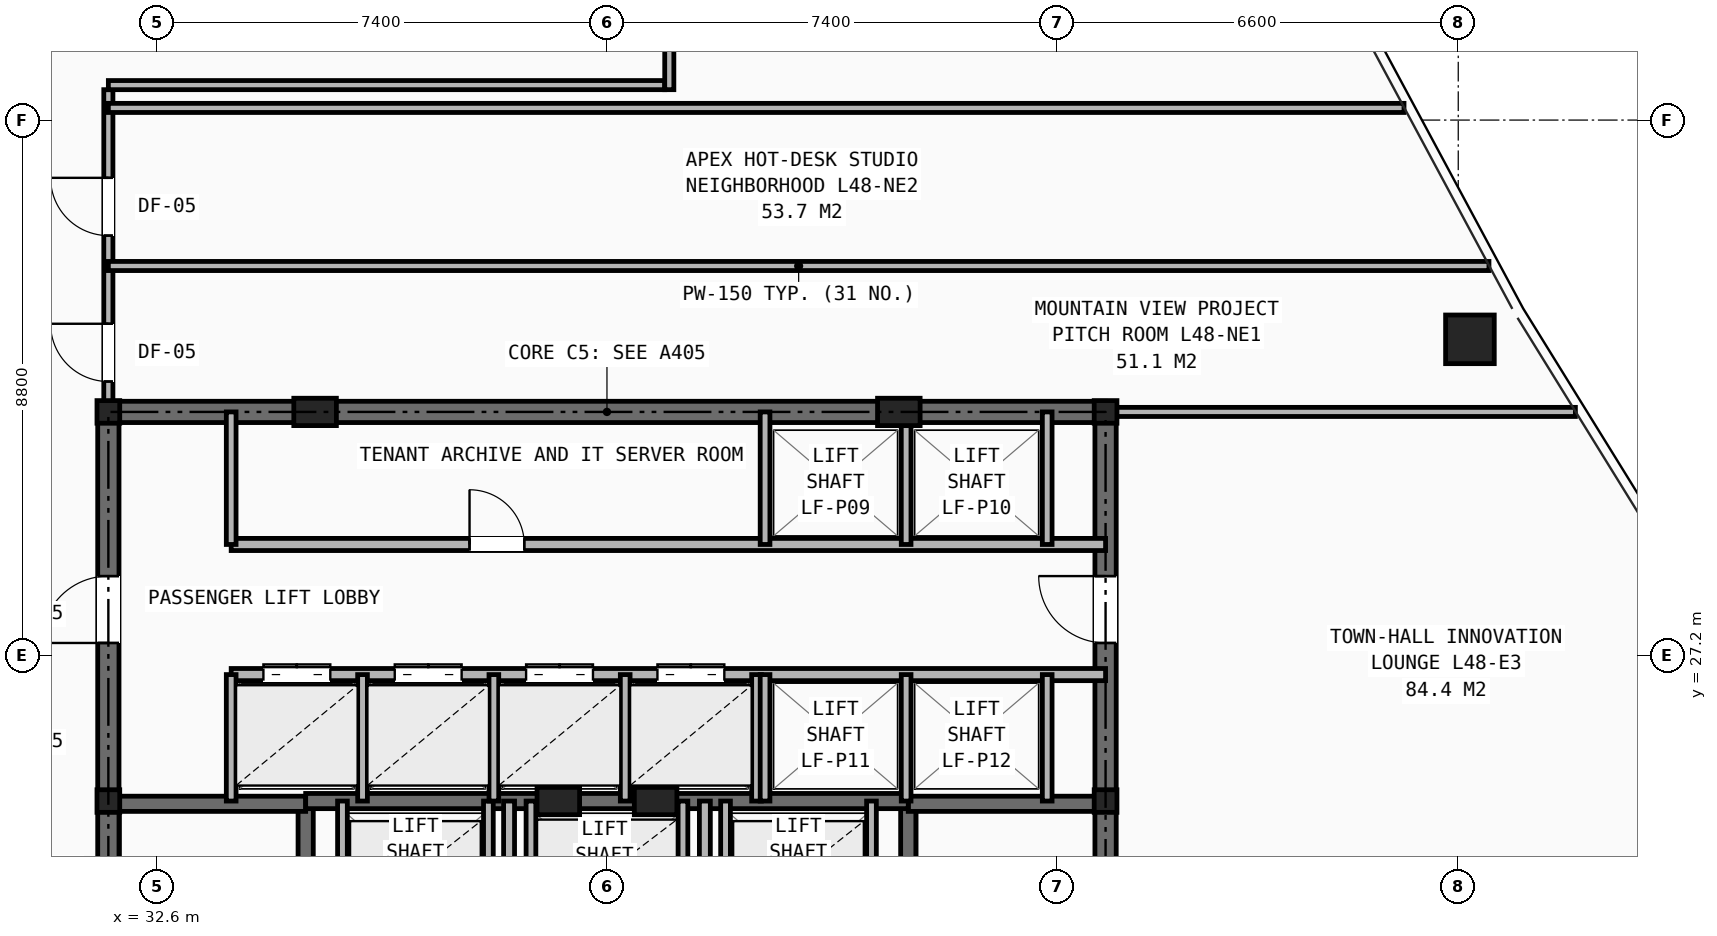
"""IFC4 building model, lengths in metres.
Left out: names, types, materials, properties, quantities, classifications, styles, units other than length and angle.
Written with IfcOpenShell. Run it as: python <this file> out.ifc"""

import sys

from ifc_helpers import new_model, si_unit, direction, frame, frame_2d, origin, origin_2d, place, context, subcontext, project, spatial, rectangle, hollow_rectangle, i_section, extrude, element, fill, save


model = new_model("IFC4")
c1 = context("Model", 3, precision=1e-05, world=origin(), true_north=direction((0.0, 1.0)))
c2 = subcontext(c1, "Body", "Model", "MODEL_VIEW")
j1 = project(units=[si_unit("LENGTHUNIT", "METRE"), si_unit("PLANEANGLEUNIT", "RADIAN")], contexts=[c1])
p1 = place(None, origin())
s1 = spatial("IfcSite", under=j1, at=p1, CompositionType="ELEMENT")
p2 = place(p1, origin())
s2 = spatial("IfcBuilding", under=s1, at=p2, CompositionType="ELEMENT")
p3 = place(p2, frame((0.0, 0.0, 168.9)))
s3 = spatial("IfcBuildingStorey", under=s2, at=p3, CompositionType="ELEMENT", Elevation=168.9)
for number, where, z_axis, x_axis in (
    (1, (31.8, 24.8, 0.0), (0.0, 0.0, 1.0), (1.0, 0.0, 0.0)),
    (2, (48.2, 24.8, 0.0), (0.0, 0.0, 1.0), (1.0, 0.0, 0.0)),
    (3, (31.8, 31.2, 0.0), (0.0, 0.0, 1.0), (1.0, 0.0, 0.0)),
    (4, (48.2, 31.2, 0.0), (0.0, 0.0, 1.0), (1.0, 0.0, 0.0)),
):
    element("IfcColumn", number, at=place(p3, frame(where, z_axis=z_axis, x_axis=x_axis)), inside=s3, PredefinedType="COLUMN", context=c2, shape_type="SweptSolid", body=[
        extrude(i_section(OverallWidth=0.374, OverallDepth=0.372, WebThickness=0.016, FlangeThickness=0.026, at=origin_2d()), origin(), (0.0, 0.0, 1.0), 3.45),
    ])
for number, where, z_axis, x_axis in (
    (5, (35.2, 31.2, 0.0), (0.0, 0.0, 1.0), (1.0, 0.0, 0.0)),
    (6, (44.8, 31.2, 0.0), (0.0, 0.0, 1.0), (1.0, 0.0, 0.0)),
    (7, (39.2, 24.8, 0.0), (0.0, 0.0, 1.0), (1.0, 0.0, 0.0)),
    (8, (40.8, 24.8, 0.0), (0.0, 0.0, 1.0), (1.0, 0.0, 0.0)),
):
    element("IfcColumn", number, at=place(p3, frame(where, z_axis=z_axis, x_axis=x_axis)), inside=s3, PredefinedType="PILASTER", context=c2, shape_type="SweptSolid", body=[
        extrude(rectangle(XDim=0.7, YDim=0.45, at=origin_2d()), origin(), (0.0, 0.0, 1.0), 3.45),
    ])
p4 = place(p3, frame((54.192, 32.394, 0.0), z_axis=(0.0, 0.0, 1.0), x_axis=(1.0, 0.0, 0.0)))
e9 = element("IfcColumn", 9, at=p4, inside=s3, PredefinedType="COLUMN", context=c2, shape_type="SweptSolid", body=[
    extrude(hollow_rectangle(XDim=0.8, YDim=0.8, WallThickness=0.055, at=origin_2d()), origin(), (0.0, 0.0, 1.0), 3.45),
])
p5 = place(p3, frame((31.8, 31.2, 0.0), z_axis=(0.0, 0.0, 1.0), x_axis=(1.0, 0.0, 0.0)))
e10 = element("IfcWall", 10, at=p5, inside=s3, PredefinedType="SHEAR", context=c2, shape_type="SweptSolid", body=[
    extrude(rectangle(XDim=16.4, YDim=0.35, at=frame_2d((8.2, 0.0))), origin(), (0.0, 0.0, 1.0), 3.21),
])
p6 = place(p3, frame((31.8, 16.4, 0.0), z_axis=(0.0, 0.0, 1.0), x_axis=(0.0, 1.0, 0.0)))
e11 = element("IfcWall", 11, at=p6, inside=s3, PredefinedType="SHEAR", context=c2, shape_type="SweptSolid", body=[
    extrude(rectangle(XDim=14.8, YDim=0.35, at=frame_2d((7.4, 0.0))), origin(), (0.0, 0.0, 1.0), 3.21),
])
p7 = place(p6, frame((11.0, 0.0, 0.0)))
e12 = element("IfcOpeningElement", 12, at=p7, cuts=e11, PredefinedType="OPENING", context=c2, shape_type="SweptSolid", body=[
    extrude(rectangle(XDim=1.1, YDim=2.15, at=frame_2d((0.55, 1.075))), frame((0.0, 0.185, 0.0), z_axis=(0.0, -1.0, 0.0), x_axis=(1.0, 0.0, 0.0)), (0.0, 0.0, 1.0), 0.37),
])
p8 = place(p3, frame((48.2, 16.4, 0.0), z_axis=(0.0, 0.0, 1.0), x_axis=(0.0, 1.0, 0.0)))
e13 = element("IfcWall", 13, at=p8, inside=s3, PredefinedType="SHEAR", context=c2, shape_type="SweptSolid", body=[
    extrude(rectangle(XDim=14.8, YDim=0.35, at=frame_2d((7.4, 0.0))), origin(), (0.0, 0.0, 1.0), 3.21),
])
p9 = place(p8, frame((11.0, 0.0, 0.0)))
e14 = element("IfcOpeningElement", 14, at=p9, cuts=e13, PredefinedType="OPENING", context=c2, shape_type="SweptSolid", body=[
    extrude(rectangle(XDim=1.1, YDim=2.15, at=frame_2d((0.55, 1.075))), frame((0.0, 0.185, 0.0), z_axis=(0.0, -1.0, 0.0), x_axis=(1.0, 0.0, 0.0)), (0.0, 0.0, 1.0), 0.37),
])
p10 = place(p3, frame((35.045, 16.4, 0.0), z_axis=(0.0, 0.0, 1.0), x_axis=(0.0, 1.0, 0.0)))
e15 = element("IfcWall", 15, at=p10, inside=s3, PredefinedType="SHEAR", context=c2, shape_type="SweptSolid", body=[
    extrude(rectangle(XDim=8.4, YDim=0.25, at=frame_2d((4.2, 0.0))), origin(), (0.0, 0.0, 1.0), 3.21),
])
p11 = place(p10, frame((0.45, 0.0, 0.0)))
e16 = element("IfcOpeningElement", 16, at=p11, cuts=e15, PredefinedType="OPENING", context=c2, shape_type="SweptSolid", body=[
    extrude(rectangle(XDim=0.95, YDim=2.1, at=frame_2d((0.475, 1.05))), frame((0.0, 0.135, 0.0), z_axis=(0.0, -1.0, 0.0), x_axis=(1.0, 0.0, 0.0)), (0.0, 0.0, 1.0), 0.27),
])
p12 = place(p3, frame((31.8, 24.755, 0.0), z_axis=(0.0, 0.0, 1.0), x_axis=(1.0, 0.0, 0.0)))
e17 = element("IfcWall", 17, at=p12, inside=s3, PredefinedType="SHEAR", context=c2, shape_type="SweptSolid", body=[
    extrude(rectangle(XDim=3.245, YDim=0.25, at=frame_2d((1.623, 0.0))), origin(), (0.0, 0.0, 1.0), 3.21),
])
p13 = place(p3, frame((44.955, 16.4, 0.0), z_axis=(0.0, 0.0, 1.0), x_axis=(0.0, 1.0, 0.0)))
e18 = element("IfcWall", 18, at=p13, inside=s3, PredefinedType="SHEAR", context=c2, shape_type="SweptSolid", body=[
    extrude(rectangle(XDim=8.4, YDim=0.25, at=frame_2d((4.2, 0.0))), origin(), (0.0, 0.0, 1.0), 3.21),
])
p14 = place(p13, frame((0.45, 0.0, 0.0)))
e19 = element("IfcOpeningElement", 19, at=p14, cuts=e18, PredefinedType="OPENING", context=c2, shape_type="SweptSolid", body=[
    extrude(rectangle(XDim=0.95, YDim=2.1, at=frame_2d((0.475, 1.05))), frame((0.0, 0.135, 0.0), z_axis=(0.0, -1.0, 0.0), x_axis=(1.0, 0.0, 0.0)), (0.0, 0.0, 1.0), 0.27),
])
p15 = place(p3, frame((44.955, 24.755, 0.0), z_axis=(0.0, 0.0, 1.0), x_axis=(1.0, 0.0, 0.0)))
e20 = element("IfcWall", 20, at=p15, inside=s3, PredefinedType="SHEAR", context=c2, shape_type="SweptSolid", body=[
    extrude(rectangle(XDim=3.245, YDim=0.25, at=frame_2d((1.623, 0.0))), origin(), (0.0, 0.0, 1.0), 3.21),
])
p16 = place(p3, frame((35.045, 24.8, 0.0), z_axis=(0.0, 0.0, 1.0), x_axis=(1.0, 0.0, 0.0)))
e21 = element("IfcWall", 21, at=p16, inside=s3, PredefinedType="SHEAR", context=c2, shape_type="SweptSolid", body=[
    extrude(rectangle(XDim=9.91, YDim=0.25, at=frame_2d((4.955, 0.0))), origin(), (0.0, 0.0, 1.0), 3.21),
])
p17 = place(p3, frame((38.39, 16.4, 0.0), z_axis=(0.0, 0.0, 1.0), x_axis=(0.0, 1.0, 0.0)))
e22 = element("IfcWall", 22, at=p17, inside=s3, PredefinedType="PARTITIONING", context=c2, shape_type="SweptSolid", body=[
    extrude(rectangle(XDim=8.4, YDim=0.18, at=frame_2d((4.2, 0.0))), origin(), (0.0, 0.0, 1.0), 2.665),
])
p18 = place(p17, frame((1.8, 0.0, 0.0)))
e23 = element("IfcOpeningElement", 23, at=p18, cuts=e22, PredefinedType="OPENING", context=c2, shape_type="SweptSolid", body=[
    extrude(rectangle(XDim=0.85, YDim=2.05, at=frame_2d((0.425, 1.025))), frame((0.0, 0.1, 0.0), z_axis=(0.0, -1.0, 0.0), x_axis=(1.0, 0.0, 0.0)), (0.0, 0.0, 1.0), 0.2),
])
p19 = place(p17, frame((4.35, 0.0, 0.0)))
e24 = element("IfcOpeningElement", 24, at=p19, cuts=e22, PredefinedType="OPENING", context=c2, shape_type="SweptSolid", body=[
    extrude(rectangle(XDim=0.95, YDim=2.1, at=frame_2d((0.475, 1.05))), frame((0.0, 0.1, 0.0), z_axis=(0.0, -1.0, 0.0), x_axis=(1.0, 0.0, 0.0)), (0.0, 0.0, 1.0), 0.2),
])
p20 = place(p3, frame((41.61, 16.4, 0.0), z_axis=(0.0, 0.0, 1.0), x_axis=(0.0, 1.0, 0.0)))
e25 = element("IfcWall", 25, at=p20, inside=s3, PredefinedType="PARTITIONING", context=c2, shape_type="SweptSolid", body=[
    extrude(rectangle(XDim=8.4, YDim=0.18, at=frame_2d((4.2, 0.0))), origin(), (0.0, 0.0, 1.0), 2.665),
])
p21 = place(p20, frame((1.8, 0.0, 0.0)))
e26 = element("IfcOpeningElement", 26, at=p21, cuts=e25, PredefinedType="OPENING", context=c2, shape_type="SweptSolid", body=[
    extrude(rectangle(XDim=0.85, YDim=2.05, at=frame_2d((0.425, 1.025))), frame((0.0, 0.1, 0.0), z_axis=(0.0, -1.0, 0.0), x_axis=(1.0, 0.0, 0.0)), (0.0, 0.0, 1.0), 0.2),
])
for number, where, z_axis, x_axis in (
    (27, (35.65, 22.48, 0.0), (0.0, 0.0, 1.0), (0.0, 1.0, 0.0)),
    (28, (38.05, 22.48, 0.0), (0.0, 0.0, 1.0), (0.0, 1.0, 0.0)),
    (29, (41.95, 22.48, 0.0), (0.0, 0.0, 1.0), (0.0, 1.0, 0.0)),
    (30, (44.35, 22.48, 0.0), (0.0, 0.0, 1.0), (0.0, 1.0, 0.0)),
    (31, (38.75, 22.48, 0.0), (0.0, 0.0, 1.0), (0.0, 1.0, 0.0)),
    (32, (41.25, 22.48, 0.0), (0.0, 0.0, 1.0), (0.0, 1.0, 0.0)),
):
    element("IfcWall", number, at=place(p3, frame(where, z_axis=z_axis, x_axis=x_axis)), inside=s3, PredefinedType="SOLIDWALL", context=c2, shape_type="SweptSolid", body=[
        extrude(rectangle(XDim=2.32, YDim=0.16, at=frame_2d((1.16, 0.0))), origin(), (0.0, 0.0, 1.0), 3.21),
    ])
p22 = place(p3, frame((33.82, 29.02, 0.0), z_axis=(0.0, 0.0, 1.0), x_axis=(1.0, 0.0, 0.0)))
e33 = element("IfcWall", 33, at=p22, inside=s3, PredefinedType="SOLIDWALL", context=c2, shape_type="SweptSolid", body=[
    extrude(rectangle(XDim=14.38, YDim=0.2, at=frame_2d((7.19, 0.0))), origin(), (0.0, 0.0, 1.0), 2.665),
])
p23 = place(p22, frame((3.92, 0.0, 0.0)))
e34 = element("IfcOpeningElement", 34, at=p23, cuts=e33, PredefinedType="OPENING", context=c2, shape_type="SweptSolid", body=[
    extrude(rectangle(XDim=0.9, YDim=2.1, at=frame_2d((0.45, 1.05))), frame((0.0, 0.11, 0.0), z_axis=(0.0, -1.0, 0.0), x_axis=(1.0, 0.0, 0.0)), (0.0, 0.0, 1.0), 0.22),
])
p24 = place(p3, frame((33.82, 26.88, 0.0), z_axis=(0.0, 0.0, 1.0), x_axis=(1.0, 0.0, 0.0)))
e35 = element("IfcWall", 35, at=p24, inside=s3, PredefinedType="SOLIDWALL", context=c2, shape_type="SweptSolid", body=[
    extrude(rectangle(XDim=14.38, YDim=0.2, at=frame_2d((7.19, 0.0))), origin(), (0.0, 0.0, 1.0), 2.665),
])
p25 = place(p24, frame((0.53, 0.0, 0.0)))
e36 = element("IfcOpeningElement", 36, at=p25, cuts=e35, PredefinedType="OPENING", context=c2, shape_type="SweptSolid", body=[
    extrude(rectangle(XDim=1.1, YDim=2.15, at=frame_2d((0.55, 1.075))), frame((0.0, 0.11, 0.0), z_axis=(0.0, -1.0, 0.0), x_axis=(1.0, 0.0, 0.0)), (0.0, 0.0, 1.0), 0.22),
])
p26 = place(p24, frame((2.69, 0.0, 0.0)))
e37 = element("IfcOpeningElement", 37, at=p26, cuts=e35, PredefinedType="OPENING", context=c2, shape_type="SweptSolid", body=[
    extrude(rectangle(XDim=1.1, YDim=2.15, at=frame_2d((0.55, 1.075))), frame((0.0, 0.11, 0.0), z_axis=(0.0, -1.0, 0.0), x_axis=(1.0, 0.0, 0.0)), (0.0, 0.0, 1.0), 0.22),
])
p27 = place(p24, frame((4.85, 0.0, 0.0)))
e38 = element("IfcOpeningElement", 38, at=p27, cuts=e35, PredefinedType="OPENING", context=c2, shape_type="SweptSolid", body=[
    extrude(rectangle(XDim=1.1, YDim=2.15, at=frame_2d((0.55, 1.075))), frame((0.0, 0.11, 0.0), z_axis=(0.0, -1.0, 0.0), x_axis=(1.0, 0.0, 0.0)), (0.0, 0.0, 1.0), 0.22),
])
p28 = place(p24, frame((7.01, 0.0, 0.0)))
e39 = element("IfcOpeningElement", 39, at=p28, cuts=e35, PredefinedType="OPENING", context=c2, shape_type="SweptSolid", body=[
    extrude(rectangle(XDim=1.1, YDim=2.15, at=frame_2d((0.55, 1.075))), frame((0.0, 0.11, 0.0), z_axis=(0.0, -1.0, 0.0), x_axis=(1.0, 0.0, 0.0)), (0.0, 0.0, 1.0), 0.22),
])
p29 = place(p3, frame((33.82, 29.02, 0.0), z_axis=(0.0, 0.0, 1.0), x_axis=(0.0, 1.0, 0.0)))
e40 = element("IfcWall", 40, at=p29, inside=s3, PredefinedType="SOLIDWALL", context=c2, shape_type="SweptSolid", body=[
    extrude(rectangle(XDim=2.18, YDim=0.16, at=frame_2d((1.09, 0.0))), origin(), (0.0, 0.0, 1.0), 2.665),
])
for number, where, z_axis, x_axis in (
    (41, (33.82, 24.8, 0.0), (0.0, 0.0, 1.0), (0.0, 1.0, 0.0)),
    (42, (35.98, 24.8, 0.0), (0.0, 0.0, 1.0), (0.0, 1.0, 0.0)),
    (43, (38.14, 24.8, 0.0), (0.0, 0.0, 1.0), (0.0, 1.0, 0.0)),
    (44, (40.3, 24.8, 0.0), (0.0, 0.0, 1.0), (0.0, 1.0, 0.0)),
    (45, (42.46, 24.8, 0.0), (0.0, 0.0, 1.0), (0.0, 1.0, 0.0)),
):
    element("IfcWall", number, at=place(p3, frame(where, z_axis=z_axis, x_axis=x_axis)), inside=s3, PredefinedType="SOLIDWALL", context=c2, shape_type="SweptSolid", body=[
        extrude(rectangle(XDim=2.08, YDim=0.16, at=frame_2d((1.04, 0.0))), origin(), (0.0, 0.0, 1.0), 3.21),
    ])
for number, where, z_axis, x_axis in (
    (46, (42.6, 29.02, 0.0), (0.0, 0.0, 1.0), (0.0, 1.0, 0.0)),
    (47, (44.92, 29.02, 0.0), (0.0, 0.0, 1.0), (0.0, 1.0, 0.0)),
    (48, (47.24, 29.02, 0.0), (0.0, 0.0, 1.0), (0.0, 1.0, 0.0)),
):
    element("IfcWall", number, at=place(p3, frame(where, z_axis=z_axis, x_axis=x_axis)), inside=s3, PredefinedType="SOLIDWALL", context=c2, shape_type="SweptSolid", body=[
        extrude(rectangle(XDim=2.18, YDim=0.16, at=frame_2d((1.09, 0.0))), origin(), (0.0, 0.0, 1.0), 2.665),
    ])
for number, where, z_axis, x_axis in (
    (49, (42.6, 24.8, 0.0), (0.0, 0.0, 1.0), (0.0, 1.0, 0.0)),
    (50, (44.92, 24.8, 0.0), (0.0, 0.0, 1.0), (0.0, 1.0, 0.0)),
    (51, (47.24, 24.8, 0.0), (0.0, 0.0, 1.0), (0.0, 1.0, 0.0)),
):
    element("IfcWall", number, at=place(p3, frame(where, z_axis=z_axis, x_axis=x_axis)), inside=s3, PredefinedType="SOLIDWALL", context=c2, shape_type="SweptSolid", body=[
        extrude(rectangle(XDim=2.08, YDim=0.16, at=frame_2d((1.04, 0.0))), origin(), (0.0, 0.0, 1.0), 3.21),
    ])
p30 = place(p3, frame((31.8, 31.2, 0.0), z_axis=(0.0, 0.0, 1.0), x_axis=(0.0, 1.0, 0.0)))
e52 = element("IfcWall", 52, at=p30, inside=s3, PredefinedType="PARTITIONING", context=c2, shape_type="SweptSolid", body=[
    extrude(rectangle(XDim=5.3, YDim=0.15, at=frame_2d((2.65, 0.0))), origin(), (0.0, 0.0, 1.0), 2.225),
])
p31 = place(p30, frame((0.5, 0.0, 0.0)))
e53 = element("IfcOpeningElement", 53, at=p31, cuts=e52, PredefinedType="OPENING", context=c2, shape_type="SweptSolid", body=[
    extrude(rectangle(XDim=0.95, YDim=2.1, at=frame_2d((0.475, 1.05))), frame((0.0, 0.085, 0.0), z_axis=(0.0, -1.0, 0.0), x_axis=(1.0, 0.0, 0.0)), (0.0, 0.0, 1.0), 0.17),
])
p32 = place(p30, frame((2.9, 0.0, 0.0)))
e54 = element("IfcOpeningElement", 54, at=p32, cuts=e52, PredefinedType="OPENING", context=c2, shape_type="SweptSolid", body=[
    extrude(rectangle(XDim=0.95, YDim=2.1, at=frame_2d((0.475, 1.05))), frame((0.0, 0.085, 0.0), z_axis=(0.0, -1.0, 0.0), x_axis=(1.0, 0.0, 0.0)), (0.0, 0.0, 1.0), 0.17),
])
p33 = place(p3, frame((48.2, 31.2, 0.0), z_axis=(0.0, 0.0, 1.0), x_axis=(1.0, 0.0, 0.0)))
e55 = element("IfcWall", 55, at=p33, inside=s3, PredefinedType="PARTITIONING", context=c2, shape_type="SweptSolid", body=[
    extrude(rectangle(XDim=7.727, YDim=0.15, at=frame_2d((3.863, 0.0))), origin(), (0.0, 0.0, 1.0), 2.225),
])
p34 = place(p3, frame((31.8, 33.6, 0.0), z_axis=(0.0, 0.0, 1.0), x_axis=(1.0, 0.0, 0.0)))
e56 = element("IfcWall", 56, at=p34, inside=s3, PredefinedType="PARTITIONING", context=c2, shape_type="SweptSolid", body=[
    extrude(rectangle(XDim=22.705, YDim=0.15, at=frame_2d((11.353, 0.0))), origin(), (0.0, 0.0, 1.0), 2.589),
])
p35 = place(p3, frame((31.8, 36.2, 0.0), z_axis=(0.0, 0.0, 1.0), x_axis=(1.0, 0.0, 0.0)))
e57 = element("IfcWall", 57, at=p35, inside=s3, PredefinedType="PARTITIONING", context=c2, shape_type="SweptSolid", body=[
    extrude(rectangle(XDim=21.308, YDim=0.15, at=frame_2d((10.654, 0.0))), origin(), (0.0, 0.0, 1.0), 2.589),
])
p36 = place(p3, frame((31.8, 36.575, 0.0), z_axis=(0.0, 0.0, 1.0), x_axis=(1.0, 0.0, 0.0)))
e58 = element("IfcWall", 58, at=p36, inside=s3, PredefinedType="PARTITIONING", context=c2, shape_type="SweptSolid", body=[
    extrude(rectangle(XDim=9.15, YDim=0.15, at=frame_2d((4.575, 0.0))), origin(), (0.0, 0.0, 1.0), 3.21),
])
p37 = place(p3, frame((41.025, 36.5, 0.0), z_axis=(0.0, 0.0, 1.0), x_axis=(0.0, 1.0, 0.0)))
e59 = element("IfcWall", 59, at=p37, inside=s3, PredefinedType="PARTITIONING", context=c2, shape_type="SweptSolid", body=[
    extrude(rectangle(XDim=1.95, YDim=0.15, at=frame_2d((0.975, 0.0))), origin(), (0.0, 0.0, 1.0), 3.21),
])
p38 = place(p7, origin())
e60 = element("IfcDoor", 60, at=p38, inside=s3, OperationType="SINGLE_SWING_LEFT", PredefinedType="DOOR", context=c2, shape_type="SweptSolid", body=[
    extrude(rectangle(XDim=1.1, YDim=2.15, at=frame_2d((0.55, 1.075))), frame((0.0, 0.025, 0.0), z_axis=(0.0, -1.0, 0.0), x_axis=(1.0, 0.0, 0.0)), (0.0, 0.0, 1.0), 0.05),
])
fill(e12, e60)
p39 = place(p9, origin())
e61 = element("IfcDoor", 61, at=p39, inside=s3, OperationType="SINGLE_SWING_RIGHT", PredefinedType="DOOR", context=c2, shape_type="SweptSolid", body=[
    extrude(rectangle(XDim=1.1, YDim=2.15, at=frame_2d((0.55, 1.075))), frame((0.0, 0.025, 0.0), z_axis=(0.0, -1.0, 0.0), x_axis=(1.0, 0.0, 0.0)), (0.0, 0.0, 1.0), 0.05),
])
fill(e14, e61)
p40 = place(p23, origin())
e62 = element("IfcDoor", 62, at=p40, inside=s3, OperationType="SINGLE_SWING_LEFT", PredefinedType="DOOR", context=c2, shape_type="SweptSolid", body=[
    extrude(rectangle(XDim=0.9, YDim=2.1, at=frame_2d((0.45, 1.05))), frame((0.0, 0.025, 0.0), z_axis=(0.0, -1.0, 0.0), x_axis=(1.0, 0.0, 0.0)), (0.0, 0.0, 1.0), 0.05),
])
fill(e34, e62)
p41 = place(p25, origin())
e63 = element("IfcDoor", 63, at=p41, inside=s3, OperationType="DOUBLE_DOOR_SLIDING", PredefinedType="DOOR", context=c2, shape_type="SweptSolid", body=[
    extrude(rectangle(XDim=1.1, YDim=2.15, at=frame_2d((0.55, 1.075))), frame((0.0, 0.025, 0.0), z_axis=(0.0, -1.0, 0.0), x_axis=(1.0, 0.0, 0.0)), (0.0, 0.0, 1.0), 0.05),
])
fill(e36, e63)
p42 = place(p26, origin())
e64 = element("IfcDoor", 64, at=p42, inside=s3, OperationType="DOUBLE_DOOR_SLIDING", PredefinedType="DOOR", context=c2, shape_type="SweptSolid", body=[
    extrude(rectangle(XDim=1.1, YDim=2.15, at=frame_2d((0.55, 1.075))), frame((0.0, 0.025, 0.0), z_axis=(0.0, -1.0, 0.0), x_axis=(1.0, 0.0, 0.0)), (0.0, 0.0, 1.0), 0.05),
])
fill(e37, e64)
p43 = place(p27, origin())
e65 = element("IfcDoor", 65, at=p43, inside=s3, OperationType="DOUBLE_DOOR_SLIDING", PredefinedType="DOOR", context=c2, shape_type="SweptSolid", body=[
    extrude(rectangle(XDim=1.1, YDim=2.15, at=frame_2d((0.55, 1.075))), frame((0.0, 0.025, 0.0), z_axis=(0.0, -1.0, 0.0), x_axis=(1.0, 0.0, 0.0)), (0.0, 0.0, 1.0), 0.05),
])
fill(e38, e65)
p44 = place(p28, origin())
e66 = element("IfcDoor", 66, at=p44, inside=s3, OperationType="DOUBLE_DOOR_SLIDING", PredefinedType="DOOR", context=c2, shape_type="SweptSolid", body=[
    extrude(rectangle(XDim=1.1, YDim=2.15, at=frame_2d((0.55, 1.075))), frame((0.0, 0.025, 0.0), z_axis=(0.0, -1.0, 0.0), x_axis=(1.0, 0.0, 0.0)), (0.0, 0.0, 1.0), 0.05),
])
fill(e39, e66)
p45 = place(p31, origin())
e67 = element("IfcDoor", 67, at=p45, inside=s3, OperationType="SINGLE_SWING_RIGHT", PredefinedType="DOOR", context=c2, shape_type="SweptSolid", body=[
    extrude(rectangle(XDim=0.95, YDim=2.1, at=frame_2d((0.475, 1.05))), frame((0.0, 0.025, 0.0), z_axis=(0.0, -1.0, 0.0), x_axis=(1.0, 0.0, 0.0)), (0.0, 0.0, 1.0), 0.05),
])
fill(e53, e67)
p46 = place(p32, origin())
e68 = element("IfcDoor", 68, at=p46, inside=s3, OperationType="SINGLE_SWING_RIGHT", PredefinedType="DOOR", context=c2, shape_type="SweptSolid", body=[
    extrude(rectangle(XDim=0.95, YDim=2.1, at=frame_2d((0.475, 1.05))), frame((0.0, 0.025, 0.0), z_axis=(0.0, -1.0, 0.0), x_axis=(1.0, 0.0, 0.0)), (0.0, 0.0, 1.0), 0.05),
])
fill(e54, e68)
save(model, sys.argv[1])
